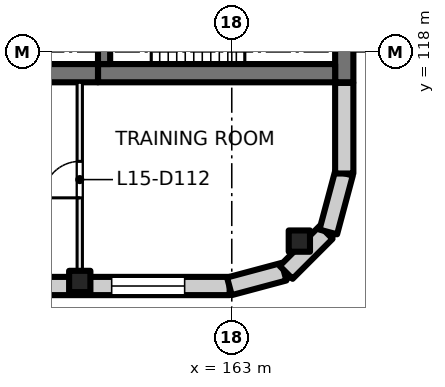
"""IFC4 building model, lengths in metres.
Left out: names, types, materials, properties, quantities, classifications, styles, units other than length and angle.
Written with IfcOpenShell. Run it as: python <this file> out.ifc"""

import sys

from ifc_helpers import new_model, si_unit, direction, frame, frame_2d, origin, origin_2d, place, context, subcontext, project, spatial, rectangle, extrude, element, fill, save


model = new_model("IFC4")
c1 = context("Model", 3, precision=1e-05, world=origin(), true_north=direction((0.0, 1.0)))
c2 = subcontext(c1, "Body", "Model", "MODEL_VIEW")
j1 = project(units=[si_unit("LENGTHUNIT", "METRE"), si_unit("PLANEANGLEUNIT", "RADIAN")], contexts=[c1])
p1 = place(None, origin())
s1 = spatial("IfcSite", under=j1, at=p1, CompositionType="ELEMENT")
p2 = place(p1, origin())
s2 = spatial("IfcBuilding", under=s1, at=p2, CompositionType="ELEMENT")
p3 = place(p2, frame((0.0, 0.0, 67.5)))
s3 = spatial("IfcBuildingStorey", under=s2, at=p3, CompositionType="ELEMENT", Elevation=67.5)
for number, where, z_axis, x_axis in (
    (1, (165.223, 111.777, 0.0), (0.0, 0.0, 1.0), (1.0, 0.0, 0.0)),
    (2, (158.0, 110.45, 0.0), (0.0, 0.0, 1.0), (1.0, 0.0, 0.0)),
):
    element("IfcColumn", number, at=place(p3, frame(where, z_axis=z_axis, x_axis=x_axis)), inside=s3, PredefinedType="COLUMN", context=c2, shape_type="SweptSolid", body=[
        extrude(rectangle(XDim=0.7, YDim=0.7, at=origin_2d()), origin(), (0.0, 0.0, 1.0), 4.0),
    ])
p4 = place(p3, frame((166.7, 120.8, 0.0), z_axis=(0.0, 0.0, 1.0), x_axis=(0.0, -1.0, 0.0)))
e3 = element("IfcWall", 3, at=p4, inside=s3, PredefinedType="SHEAR", context=c2, shape_type="SweptSolid", body=[
    extrude(rectangle(XDim=3.8, YDim=0.6, at=frame_2d((1.9, 0.0))), origin(), (0.0, 0.0, 1.0), 4.0),
])
p5 = place(p3, frame((166.4, 117.3, 0.0), z_axis=(0.0, 0.0, 1.0), x_axis=(-1.0, 0.0, 0.0)))
e4 = element("IfcWall", 4, at=p5, inside=s3, PredefinedType="SHEAR", context=c2, shape_type="SweptSolid", body=[
    extrude(rectangle(XDim=7.8, YDim=0.6, at=frame_2d((3.9, 0.0))), origin(), (0.0, 0.0, 1.0), 4.0),
])
p6 = place(p3, frame((158.6, 117.3, 0.0), z_axis=(0.0, 0.0, 1.0), x_axis=(-1.0, 0.0, 0.0)))
e5 = element("IfcWall", 5, at=p6, inside=s3, PredefinedType="SHEAR", context=c2, shape_type="SweptSolid", body=[
    extrude(rectangle(XDim=4.6, YDim=0.6, at=frame_2d((2.3, 0.0))), origin(), (0.0, 0.0, 1.0), 4.0),
])
p7 = place(p3, frame((158.8, 120.4, 0.0), z_axis=(0.0, 0.0, 1.0), x_axis=(0.0, -1.0, 0.0)))
e6 = element("IfcWall", 6, at=p7, inside=s3, PredefinedType="SHEAR", context=c2, shape_type="SweptSolid", body=[
    extrude(rectangle(XDim=2.8, YDim=0.4, at=frame_2d((1.4, 0.0))), origin(), (0.0, 0.0, 1.0), 4.0),
])
p8 = place(p7, frame((0.9, 0.0, 0.0)))
e7 = element("IfcOpeningElement", 7, at=p8, cuts=e6, PredefinedType="OPENING", context=c2, shape_type="SweptSolid", body=[
    extrude(rectangle(XDim=1.0, YDim=2.1, at=frame_2d((0.5, 1.05))), frame((0.0, 0.21, 0.0), z_axis=(0.0, -1.0, 0.0), x_axis=(1.0, 0.0, 0.0)), (0.0, 0.0, 1.0), 0.42),
])
p9 = place(p3, frame((162.93, 110.3, 0.0), z_axis=(0.0, 0.0, 1.0), x_axis=(-1.0, 0.0, 0.0)))
e8 = element("IfcWall", 8, at=p9, inside=s3, PredefinedType="SOLIDWALL", context=c2, shape_type="SweptSolid", body=[
    extrude(rectangle(XDim=31.93, YDim=0.6, at=frame_2d((15.965, 0.0))), origin(), (0.0, 0.0, 1.0), 3.625),
])
p10 = place(p9, frame((1.48, 0.0, 0.9)))
e9 = element("IfcOpeningElement", 9, at=p10, cuts=e8, PredefinedType="OPENING", context=c2, shape_type="SweptSolid", body=[
    extrude(rectangle(XDim=2.4, YDim=2.4, at=frame_2d((1.2, 1.2))), frame((0.0, 0.31, 0.0), z_axis=(0.0, -1.0, 0.0), x_axis=(1.0, 0.0, 0.0)), (0.0, 0.0, 1.0), 0.62),
])
p11 = place(p9, frame((5.98, 0.0, 0.9)))
e10 = element("IfcOpeningElement", 10, at=p11, cuts=e8, PredefinedType="OPENING", context=c2, shape_type="SweptSolid", body=[
    extrude(rectangle(XDim=2.4, YDim=2.4, at=frame_2d((1.2, 1.2))), frame((0.0, 0.31, 0.0), z_axis=(0.0, -1.0, 0.0), x_axis=(1.0, 0.0, 0.0)), (0.0, 0.0, 1.0), 0.62),
])
p12 = place(p9, frame((10.48, 0.0, 0.9)))
e11 = element("IfcOpeningElement", 11, at=p12, cuts=e8, PredefinedType="OPENING", context=c2, shape_type="SweptSolid", body=[
    extrude(rectangle(XDim=2.4, YDim=2.4, at=frame_2d((1.2, 1.2))), frame((0.0, 0.31, 0.0), z_axis=(0.0, -1.0, 0.0), x_axis=(1.0, 0.0, 0.0)), (0.0, 0.0, 1.0), 0.62),
])
p13 = place(p9, frame((14.98, 0.0, 0.9)))
e12 = element("IfcOpeningElement", 12, at=p13, cuts=e8, PredefinedType="OPENING", context=c2, shape_type="SweptSolid", body=[
    extrude(rectangle(XDim=2.4, YDim=2.4, at=frame_2d((1.2, 1.2))), frame((0.0, 0.31, 0.0), z_axis=(0.0, -1.0, 0.0), x_axis=(1.0, 0.0, 0.0)), (0.0, 0.0, 1.0), 0.62),
])
p14 = place(p9, frame((19.48, 0.0, 0.9)))
e13 = element("IfcOpeningElement", 13, at=p14, cuts=e8, PredefinedType="OPENING", context=c2, shape_type="SweptSolid", body=[
    extrude(rectangle(XDim=2.4, YDim=2.4, at=frame_2d((1.2, 1.2))), frame((0.0, 0.31, 0.0), z_axis=(0.0, -1.0, 0.0), x_axis=(1.0, 0.0, 0.0)), (0.0, 0.0, 1.0), 0.62),
])
p15 = place(p9, frame((23.98, 0.0, 0.9)))
e14 = element("IfcOpeningElement", 14, at=p15, cuts=e8, PredefinedType="OPENING", context=c2, shape_type="SweptSolid", body=[
    extrude(rectangle(XDim=2.4, YDim=2.4, at=frame_2d((1.2, 1.2))), frame((0.0, 0.31, 0.0), z_axis=(0.0, -1.0, 0.0), x_axis=(1.0, 0.0, 0.0)), (0.0, 0.0, 1.0), 0.62),
])
p16 = place(p9, frame((28.48, 0.0, 0.9)))
e15 = element("IfcOpeningElement", 15, at=p16, cuts=e8, PredefinedType="OPENING", context=c2, shape_type="SweptSolid", body=[
    extrude(rectangle(XDim=2.4, YDim=2.4, at=frame_2d((1.2, 1.2))), frame((0.0, 0.31, 0.0), z_axis=(0.0, -1.0, 0.0), x_axis=(1.0, 0.0, 0.0)), (0.0, 0.0, 1.0), 0.62),
])
for number, where, z_axis, x_axis in (
    (16, (164.719, 110.771, 0.0), (0.0, 0.0, 1.0), (-0.966, -0.259, 0.0)),
    (17, (166.104, 112.064, 0.0), (0.0, 0.0, 1.0), (-0.707, -0.707, 0.0)),
):
    element("IfcWall", number, at=place(p3, frame(where, z_axis=z_axis, x_axis=x_axis)), inside=s3, PredefinedType="SOLIDWALL", context=c2, shape_type="SweptSolid", body=[
        extrude(rectangle(XDim=1.861, YDim=0.6, at=frame_2d((0.93, 0.0))), origin(), (0.0, 0.0, 1.0), 3.625),
    ])
p17 = place(p3, frame((166.692, 114.01, 0.0), z_axis=(0.0, 0.0, 1.0), x_axis=(-0.258839784042, -0.965920269068, 0.0)))
e18 = element("IfcWall", 18, at=p17, inside=s3, PredefinedType="SOLIDWALL", context=c2, shape_type="SweptSolid", body=[
    extrude(rectangle(XDim=2.0, YDim=0.6, at=frame_2d((1.0, 0.0))), origin(), (0.0, 0.0, 1.0), 3.625),
])
p18 = place(p3, frame((166.7, 116.98, 0.0), z_axis=(0.0, 0.0, 1.0), x_axis=(0.0, -1.0, 0.0)))
e19 = element("IfcWall", 19, at=p18, inside=s3, PredefinedType="SOLIDWALL", context=c2, shape_type="SweptSolid", body=[
    extrude(rectangle(XDim=2.98, YDim=0.6, at=frame_2d((1.49, 0.0))), origin(), (0.0, 0.0, 1.0), 3.625),
])
p19 = place(p3, frame((158.0, 110.6, 0.0), z_axis=(0.0, 0.0, 1.0), x_axis=(0.0, 1.0, 0.0)))
e20 = element("IfcWall", 20, at=p19, inside=s3, PredefinedType="PARTITIONING", context=c2, shape_type="SweptSolid", body=[
    extrude(rectangle(XDim=6.4, YDim=0.175, at=frame_2d((3.2, 0.0))), origin(), (0.0, 0.0, 1.0), 3.625),
])
p20 = place(p19, frame((2.6, 0.0, 0.0)))
e21 = element("IfcOpeningElement", 21, at=p20, cuts=e20, PredefinedType="OPENING", context=c2, shape_type="SweptSolid", body=[
    extrude(rectangle(XDim=1.2, YDim=2.1, at=frame_2d((0.6, 1.05))), frame((0.0, 0.097, 0.0), z_axis=(0.0, -1.0, 0.0), x_axis=(1.0, 0.0, 0.0)), (0.0, 0.0, 1.0), 0.195),
])
p21 = place(p10, origin())
e22 = element("IfcWindow", 22, at=p21, inside=s3, PartitioningType="SINGLE_PANEL", PredefinedType="WINDOW", context=c2, shape_type="SweptSolid", body=[
    extrude(rectangle(XDim=2.4, YDim=2.4, at=frame_2d((1.2, 1.2))), frame((0.0, 0.03, 0.0), z_axis=(0.0, -1.0, 0.0), x_axis=(1.0, 0.0, 0.0)), (0.0, 0.0, 1.0), 0.06),
])
fill(e9, e22)
p22 = place(p20, origin())
e23 = element("IfcDoor", 23, at=p22, inside=s3, OperationType="DOUBLE_DOOR_SINGLE_SWING", PredefinedType="DOOR", context=c2, shape_type="SweptSolid", body=[
    extrude(rectangle(XDim=1.2, YDim=2.1, at=frame_2d((0.6, 1.05))), frame((0.0, 0.025, 0.0), z_axis=(0.0, -1.0, 0.0), x_axis=(1.0, 0.0, 0.0)), (0.0, 0.0, 1.0), 0.05),
])
fill(e21, e23)
save(model, sys.argv[1])
